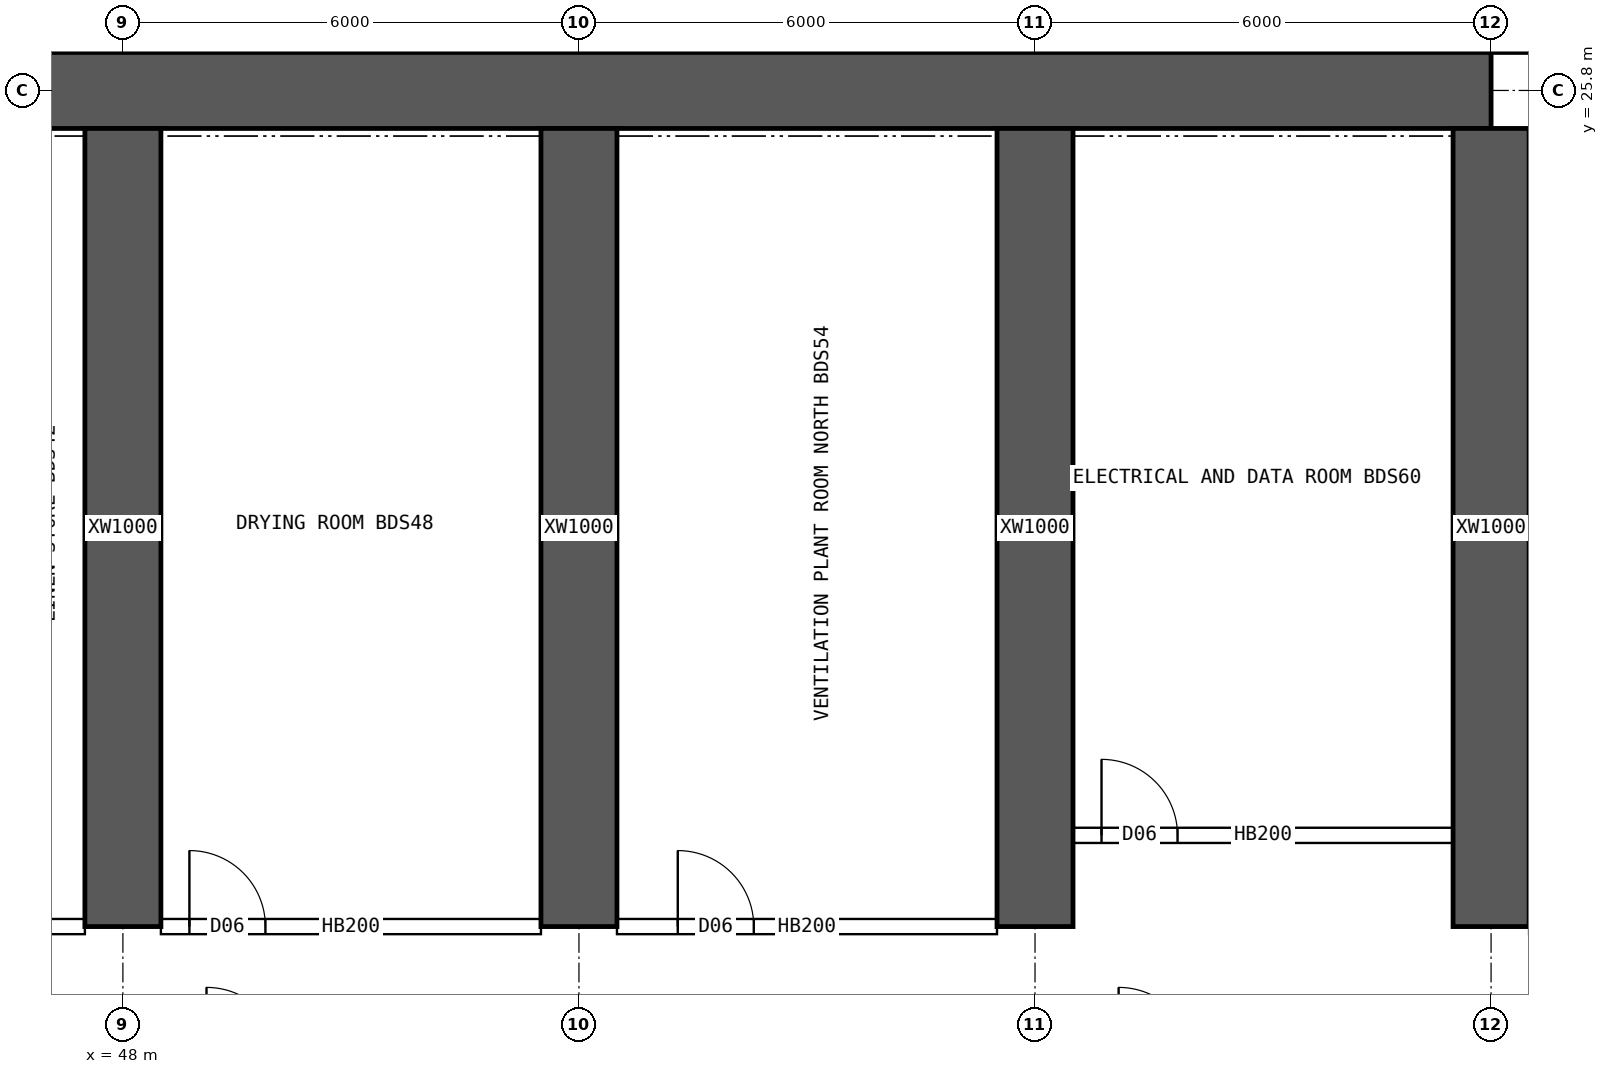
"""IFC4 building model, lengths in metres.
Left out: names, types, materials, properties, quantities, classifications, styles, units other than length and angle.
Written with IfcOpenShell. Run it as: python <this file> out.ifc"""

import sys

from ifc_helpers import new_model, si_unit, direction, frame, frame_2d, origin, place, context, subcontext, project, spatial, rectangle, extrude, element, fill, save


model = new_model("IFC4")
c1 = context("Model", 3, precision=1e-05, world=origin(), true_north=direction((0.0, 1.0)))
c2 = subcontext(c1, "Body", "Model", "MODEL_VIEW")
j1 = project(units=[si_unit("LENGTHUNIT", "METRE"), si_unit("PLANEANGLEUNIT", "RADIAN")], contexts=[c1])
p1 = place(None, origin())
s1 = spatial("IfcSite", under=j1, at=p1, CompositionType="ELEMENT")
p2 = place(p1, origin())
s2 = spatial("IfcBuilding", under=s1, at=p2, CompositionType="ELEMENT")
p3 = place(p2, frame((0.0, 0.0, 42.7)))
s3 = spatial("IfcBuildingStorey", under=s2, at=p3, CompositionType="ELEMENT", Elevation=42.7)
p4 = place(p3, frame((18.0, 25.8, 0.0), z_axis=(0.0, 0.0, 1.0), x_axis=(1.0, 0.0, 0.0)))
e1 = element("IfcWall", 1, at=p4, inside=s3, PredefinedType="SHEAR", context=c2, shape_type="SweptSolid", body=[
    extrude(rectangle(XDim=48.0, YDim=1.0, at=frame_2d((24.0, 0.0))), origin(), (0.0, 0.0, 1.0), 3.75),
])
for number, where, z_axis, x_axis in (
    (2, (48.0, 14.8, 0.0), (0.0, 0.0, 1.0), (0.0, 1.0, 0.0)),
    (3, (54.0, 14.8, 0.0), (0.0, 0.0, 1.0), (0.0, 1.0, 0.0)),
    (4, (60.0, 14.8, 0.0), (0.0, 0.0, 1.0), (0.0, 1.0, 0.0)),
    (5, (66.0, 14.8, 0.0), (0.0, 0.0, 1.0), (0.0, 1.0, 0.0)),
):
    element("IfcWall", number, at=place(p3, frame(where, z_axis=z_axis, x_axis=x_axis)), inside=s3, PredefinedType="SHEAR", context=c2, shape_type="SweptSolid", body=[
        extrude(rectangle(XDim=10.5, YDim=1.0, at=frame_2d((5.25, 0.0))), origin(), (0.0, 0.0, 1.0), 3.75),
    ])
p5 = place(p3, frame((42.5, 14.8, 0.0), z_axis=(0.0, 0.0, 1.0), x_axis=(1.0, 0.0, 0.0)))
e6 = element("IfcWall", 6, at=p5, inside=s3, PredefinedType="SOLIDWALL", context=c2, shape_type="SweptSolid", body=[
    extrude(rectangle(XDim=5.0, YDim=0.2, at=frame_2d((2.5, 0.0))), origin(), (0.0, 0.0, 1.0), 3.5),
])
p6 = place(p5, frame((0.35, 0.0, 0.0)))
e7 = element("IfcOpeningElement", 7, at=p6, cuts=e6, PredefinedType="OPENING", context=c2, shape_type="SweptSolid", body=[
    extrude(rectangle(XDim=0.9, YDim=2.1, at=frame_2d((0.45, 1.05))), frame((0.0, 0.11, 0.0), z_axis=(0.0, -1.0, 0.0), x_axis=(1.0, 0.0, 0.0)), (0.0, 0.0, 1.0), 0.22),
])
p7 = place(p5, frame((3.405, 0.0, 0.0)))
e8 = element("IfcOpeningElement", 8, at=p7, cuts=e6, PredefinedType="OPENING", context=c2, shape_type="SweptSolid", body=[
    extrude(rectangle(XDim=0.9, YDim=2.1, at=frame_2d((0.45, 1.05))), frame((0.0, 0.11, 0.0), z_axis=(0.0, -1.0, 0.0), x_axis=(1.0, 0.0, 0.0)), (0.0, 0.0, 1.0), 0.22),
])
p8 = place(p3, frame((48.5, 14.8, 0.0), z_axis=(0.0, 0.0, 1.0), x_axis=(1.0, 0.0, 0.0)))
e9 = element("IfcWall", 9, at=p8, inside=s3, PredefinedType="SOLIDWALL", context=c2, shape_type="SweptSolid", body=[
    extrude(rectangle(XDim=5.0, YDim=0.2, at=frame_2d((2.5, 0.0))), origin(), (0.0, 0.0, 1.0), 3.5),
])
p9 = place(p8, frame((0.375, 0.0, 0.0)))
e10 = element("IfcOpeningElement", 10, at=p9, cuts=e9, PredefinedType="OPENING", context=c2, shape_type="SweptSolid", body=[
    extrude(rectangle(XDim=1.0, YDim=2.1, at=frame_2d((0.5, 1.05))), frame((0.0, 0.11, 0.0), z_axis=(0.0, -1.0, 0.0), x_axis=(1.0, 0.0, 0.0)), (0.0, 0.0, 1.0), 0.22),
])
p10 = place(p3, frame((54.5, 14.8, 0.0), z_axis=(0.0, 0.0, 1.0), x_axis=(1.0, 0.0, 0.0)))
e11 = element("IfcWall", 11, at=p10, inside=s3, PredefinedType="SOLIDWALL", context=c2, shape_type="SweptSolid", body=[
    extrude(rectangle(XDim=5.0, YDim=0.2, at=frame_2d((2.5, 0.0))), origin(), (0.0, 0.0, 1.0), 3.5),
])
p11 = place(p10, frame((0.8, 0.0, 0.0)))
e12 = element("IfcOpeningElement", 12, at=p11, cuts=e11, PredefinedType="OPENING", context=c2, shape_type="SweptSolid", body=[
    extrude(rectangle(XDim=1.0, YDim=2.1, at=frame_2d((0.5, 1.05))), frame((0.0, 0.11, 0.0), z_axis=(0.0, -1.0, 0.0), x_axis=(1.0, 0.0, 0.0)), (0.0, 0.0, 1.0), 0.22),
])
p12 = place(p3, frame((60.5, 16.0, 0.0), z_axis=(0.0, 0.0, 1.0), x_axis=(1.0, 0.0, 0.0)))
e13 = element("IfcWall", 13, at=p12, inside=s3, PredefinedType="SOLIDWALL", context=c2, shape_type="SweptSolid", body=[
    extrude(rectangle(XDim=5.0, YDim=0.2, at=frame_2d((2.5, 0.0))), origin(), (0.0, 0.0, 1.0), 3.5),
])
p13 = place(p12, frame((0.375, 0.0, 0.0)))
e14 = element("IfcOpeningElement", 14, at=p13, cuts=e13, PredefinedType="OPENING", context=c2, shape_type="SweptSolid", body=[
    extrude(rectangle(XDim=1.0, YDim=2.1, at=frame_2d((0.5, 1.05))), frame((0.0, 0.11, 0.0), z_axis=(0.0, -1.0, 0.0), x_axis=(1.0, 0.0, 0.0)), (0.0, 0.0, 1.0), 0.22),
])
p14 = place(p9, origin())
e15 = element("IfcDoor", 15, at=p14, inside=s3, OperationType="SINGLE_SWING_LEFT", PredefinedType="DOOR", context=c2, shape_type="SweptSolid", body=[
    extrude(rectangle(XDim=1.0, YDim=2.1, at=frame_2d((0.5, 1.05))), frame((0.0, 0.025, 0.0), z_axis=(0.0, -1.0, 0.0), x_axis=(1.0, 0.0, 0.0)), (0.0, 0.0, 1.0), 0.05),
])
fill(e10, e15)
p15 = place(p11, origin())
e16 = element("IfcDoor", 16, at=p15, inside=s3, OperationType="SINGLE_SWING_LEFT", PredefinedType="DOOR", context=c2, shape_type="SweptSolid", body=[
    extrude(rectangle(XDim=1.0, YDim=2.1, at=frame_2d((0.5, 1.05))), frame((0.0, 0.025, 0.0), z_axis=(0.0, -1.0, 0.0), x_axis=(1.0, 0.0, 0.0)), (0.0, 0.0, 1.0), 0.05),
])
fill(e12, e16)
p16 = place(p13, origin())
e17 = element("IfcDoor", 17, at=p16, inside=s3, OperationType="SINGLE_SWING_LEFT", PredefinedType="DOOR", context=c2, shape_type="SweptSolid", body=[
    extrude(rectangle(XDim=1.0, YDim=2.1, at=frame_2d((0.5, 1.05))), frame((0.0, 0.025, 0.0), z_axis=(0.0, -1.0, 0.0), x_axis=(1.0, 0.0, 0.0)), (0.0, 0.0, 1.0), 0.05),
])
fill(e14, e17)
save(model, sys.argv[1])
